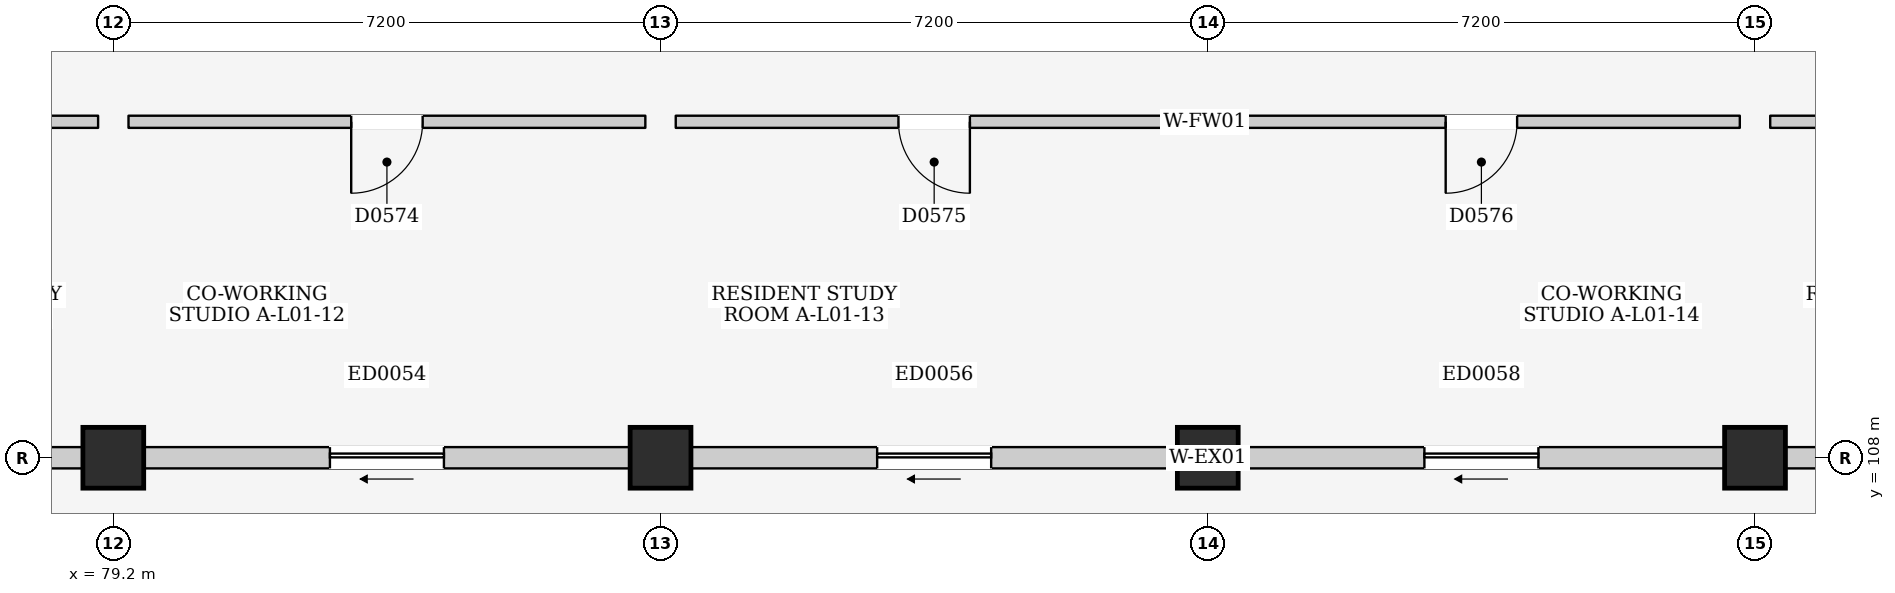
"""IFC4 building model, lengths in metres.
Left out: names, types, materials, properties, quantities, classifications, styles, units other than length and angle.
Written with IfcOpenShell. Run it as: python <this file> out.ifc"""

import sys

from ifc_helpers import new_model, si_unit, direction, frame, frame_2d, origin, origin_2d, place, context, subcontext, project, spatial, rectangle, extrude, element, fill, save


model = new_model("IFC4")
c1 = context("Model", 3, precision=1e-05, world=origin(), true_north=direction((0.0, 1.0)))
c2 = subcontext(c1, "Body", "Model", "MODEL_VIEW")
j1 = project(units=[si_unit("LENGTHUNIT", "METRE"), si_unit("PLANEANGLEUNIT", "RADIAN")], contexts=[c1])
p1 = place(None, origin())
s1 = spatial("IfcSite", under=j1, at=p1, CompositionType="ELEMENT")
p2 = place(p1, origin())
s2 = spatial("IfcBuilding", under=s1, at=p2, CompositionType="ELEMENT")
p3 = place(p2, frame((0.0, 0.0, 4.5)))
s3 = spatial("IfcBuildingStorey", under=s2, at=p3, CompositionType="ELEMENT", Elevation=4.5)
for number, where, z_axis, x_axis in (
    (1, (79.2, 108.0, 0.0), (0.0, 0.0, 1.0), (1.0, 0.0, 0.0)),
    (2, (86.4, 108.0, 0.0), (0.0, 0.0, 1.0), (1.0, 0.0, 0.0)),
    (3, (93.6, 108.0, 0.0), (0.0, 0.0, 1.0), (1.0, 0.0, 0.0)),
    (4, (100.8, 108.0, 0.0), (0.0, 0.0, 1.0), (1.0, 0.0, 0.0)),
):
    element("IfcColumn", number, at=place(p3, frame(where, z_axis=z_axis, x_axis=x_axis)), inside=s3, PredefinedType="COLUMN", context=c2, shape_type="SweptSolid", body=[
        extrude(rectangle(XDim=0.8, YDim=0.8, at=origin_2d()), origin(), (0.0, 0.0, 1.0), 4.5),
    ])
p4 = place(p3, frame((72.4, 108.0, 0.0), z_axis=(0.0, 0.0, 1.0), x_axis=(1.0, 0.0, 0.0)))
e5 = element("IfcWall", 5, at=p4, inside=s3, PredefinedType="ELEMENTEDWALL", context=c2, shape_type="SweptSolid", body=[
    extrude(rectangle(XDim=6.4, YDim=0.28, at=frame_2d((3.2, 0.0))), origin(), (0.0, 0.0, 1.0), 3.585),
])
p5 = place(p4, frame((2.45, 0.0, 0.0)))
e6 = element("IfcOpeningElement", 6, at=p5, cuts=e5, PredefinedType="OPENING", context=c2, shape_type="SweptSolid", body=[
    extrude(rectangle(XDim=1.5, YDim=2.12, at=frame_2d((0.75, 1.06))), frame((0.0, 0.155, 0.0), z_axis=(0.0, -1.0, 0.0), x_axis=(1.0, 0.0, 0.0)), (0.0, 0.0, 1.0), 0.31),
])
p6 = place(p3, frame((79.6, 108.0, 0.0), z_axis=(0.0, 0.0, 1.0), x_axis=(1.0, 0.0, 0.0)))
e7 = element("IfcWall", 7, at=p6, inside=s3, PredefinedType="ELEMENTEDWALL", context=c2, shape_type="SweptSolid", body=[
    extrude(rectangle(XDim=6.4, YDim=0.28, at=frame_2d((3.2, 0.0))), origin(), (0.0, 0.0, 1.0), 3.585),
])
p7 = place(p6, frame((2.45, 0.0, 0.0)))
e8 = element("IfcOpeningElement", 8, at=p7, cuts=e7, PredefinedType="OPENING", context=c2, shape_type="SweptSolid", body=[
    extrude(rectangle(XDim=1.5, YDim=2.12, at=frame_2d((0.75, 1.06))), frame((0.0, 0.155, 0.0), z_axis=(0.0, -1.0, 0.0), x_axis=(1.0, 0.0, 0.0)), (0.0, 0.0, 1.0), 0.31),
])
p8 = place(p3, frame((86.8, 108.0, 0.0), z_axis=(0.0, 0.0, 1.0), x_axis=(1.0, 0.0, 0.0)))
e9 = element("IfcWall", 9, at=p8, inside=s3, PredefinedType="ELEMENTEDWALL", context=c2, shape_type="SweptSolid", body=[
    extrude(rectangle(XDim=6.4, YDim=0.28, at=frame_2d((3.2, 0.0))), origin(), (0.0, 0.0, 1.0), 3.585),
])
p9 = place(p8, frame((2.45, 0.0, 0.0)))
e10 = element("IfcOpeningElement", 10, at=p9, cuts=e9, PredefinedType="OPENING", context=c2, shape_type="SweptSolid", body=[
    extrude(rectangle(XDim=1.5, YDim=2.12, at=frame_2d((0.75, 1.06))), frame((0.0, 0.155, 0.0), z_axis=(0.0, -1.0, 0.0), x_axis=(1.0, 0.0, 0.0)), (0.0, 0.0, 1.0), 0.31),
])
p10 = place(p3, frame((94.0, 108.0, 0.0), z_axis=(0.0, 0.0, 1.0), x_axis=(1.0, 0.0, 0.0)))
e11 = element("IfcWall", 11, at=p10, inside=s3, PredefinedType="ELEMENTEDWALL", context=c2, shape_type="SweptSolid", body=[
    extrude(rectangle(XDim=6.4, YDim=0.28, at=frame_2d((3.2, 0.0))), origin(), (0.0, 0.0, 1.0), 3.585),
])
p11 = place(p10, frame((2.45, 0.0, 0.0)))
e12 = element("IfcOpeningElement", 12, at=p11, cuts=e11, PredefinedType="OPENING", context=c2, shape_type="SweptSolid", body=[
    extrude(rectangle(XDim=1.5, YDim=2.12, at=frame_2d((0.75, 1.06))), frame((0.0, 0.155, 0.0), z_axis=(0.0, -1.0, 0.0), x_axis=(1.0, 0.0, 0.0)), (0.0, 0.0, 1.0), 0.31),
])
p12 = place(p3, frame((101.2, 108.0, 0.0), z_axis=(0.0, 0.0, 1.0), x_axis=(1.0, 0.0, 0.0)))
e13 = element("IfcWall", 13, at=p12, inside=s3, PredefinedType="ELEMENTEDWALL", context=c2, shape_type="SweptSolid", body=[
    extrude(rectangle(XDim=6.4, YDim=0.28, at=frame_2d((3.2, 0.0))), origin(), (0.0, 0.0, 1.0), 3.585),
])
p13 = place(p12, frame((2.45, 0.0, 0.0)))
e14 = element("IfcOpeningElement", 14, at=p13, cuts=e13, PredefinedType="OPENING", context=c2, shape_type="SweptSolid", body=[
    extrude(rectangle(XDim=1.5, YDim=2.12, at=frame_2d((0.75, 1.06))), frame((0.0, 0.155, 0.0), z_axis=(0.0, -1.0, 0.0), x_axis=(1.0, 0.0, 0.0)), (0.0, 0.0, 1.0), 0.31),
])
p14 = place(p3, frame((72.2, 112.42, 0.0), z_axis=(0.0, 0.0, 1.0), x_axis=(1.0, 0.0, 0.0)))
e15 = element("IfcWall", 15, at=p14, inside=s3, PredefinedType="PARTITIONING", context=c2, shape_type="SweptSolid", body=[
    extrude(rectangle(XDim=6.8, YDim=0.16, at=frame_2d((3.4, 0.0))), origin(), (0.0, 0.0, 1.0), 4.25),
])
p15 = place(p14, frame((2.93, 0.0, 0.0)))
e16 = element("IfcOpeningElement", 16, at=p15, cuts=e15, PredefinedType="OPENING", context=c2, shape_type="SweptSolid", body=[
    extrude(rectangle(XDim=0.94, YDim=2.12, at=frame_2d((0.47, 1.06))), frame((0.0, 0.095, 0.0), z_axis=(0.0, -1.0, 0.0), x_axis=(1.0, 0.0, 0.0)), (0.0, 0.0, 1.0), 0.19),
])
p16 = place(p3, frame((79.4, 112.42, 0.0), z_axis=(0.0, 0.0, 1.0), x_axis=(1.0, 0.0, 0.0)))
e17 = element("IfcWall", 17, at=p16, inside=s3, PredefinedType="PARTITIONING", context=c2, shape_type="SweptSolid", body=[
    extrude(rectangle(XDim=6.8, YDim=0.16, at=frame_2d((3.4, 0.0))), origin(), (0.0, 0.0, 1.0), 4.25),
])
p17 = place(p16, frame((2.93, 0.0, 0.0)))
e18 = element("IfcOpeningElement", 18, at=p17, cuts=e17, PredefinedType="OPENING", context=c2, shape_type="SweptSolid", body=[
    extrude(rectangle(XDim=0.94, YDim=2.12, at=frame_2d((0.47, 1.06))), frame((0.0, 0.095, 0.0), z_axis=(0.0, -1.0, 0.0), x_axis=(1.0, 0.0, 0.0)), (0.0, 0.0, 1.0), 0.19),
])
p18 = place(p3, frame((86.6, 112.42, 0.0), z_axis=(0.0, 0.0, 1.0), x_axis=(1.0, 0.0, 0.0)))
e19 = element("IfcWall", 19, at=p18, inside=s3, PredefinedType="PARTITIONING", context=c2, shape_type="SweptSolid", body=[
    extrude(rectangle(XDim=6.8, YDim=0.16, at=frame_2d((3.4, 0.0))), origin(), (0.0, 0.0, 1.0), 4.25),
])
p19 = place(p18, frame((2.93, 0.0, 0.0)))
e20 = element("IfcOpeningElement", 20, at=p19, cuts=e19, PredefinedType="OPENING", context=c2, shape_type="SweptSolid", body=[
    extrude(rectangle(XDim=0.94, YDim=2.12, at=frame_2d((0.47, 1.06))), frame((0.0, 0.095, 0.0), z_axis=(0.0, -1.0, 0.0), x_axis=(1.0, 0.0, 0.0)), (0.0, 0.0, 1.0), 0.19),
])
p20 = place(p3, frame((93.8, 112.42, 0.0), z_axis=(0.0, 0.0, 1.0), x_axis=(1.0, 0.0, 0.0)))
e21 = element("IfcWall", 21, at=p20, inside=s3, PredefinedType="PARTITIONING", context=c2, shape_type="SweptSolid", body=[
    extrude(rectangle(XDim=6.8, YDim=0.16, at=frame_2d((3.4, 0.0))), origin(), (0.0, 0.0, 1.0), 4.25),
])
p21 = place(p20, frame((2.93, 0.0, 0.0)))
e22 = element("IfcOpeningElement", 22, at=p21, cuts=e21, PredefinedType="OPENING", context=c2, shape_type="SweptSolid", body=[
    extrude(rectangle(XDim=0.94, YDim=2.12, at=frame_2d((0.47, 1.06))), frame((0.0, 0.095, 0.0), z_axis=(0.0, -1.0, 0.0), x_axis=(1.0, 0.0, 0.0)), (0.0, 0.0, 1.0), 0.19),
])
p22 = place(p3, frame((101.0, 112.42, 0.0), z_axis=(0.0, 0.0, 1.0), x_axis=(1.0, 0.0, 0.0)))
e23 = element("IfcWall", 23, at=p22, inside=s3, PredefinedType="PARTITIONING", context=c2, shape_type="SweptSolid", body=[
    extrude(rectangle(XDim=6.8, YDim=0.16, at=frame_2d((3.4, 0.0))), origin(), (0.0, 0.0, 1.0), 4.25),
])
p23 = place(p22, frame((2.93, 0.0, 0.0)))
e24 = element("IfcOpeningElement", 24, at=p23, cuts=e23, PredefinedType="OPENING", context=c2, shape_type="SweptSolid", body=[
    extrude(rectangle(XDim=0.94, YDim=2.12, at=frame_2d((0.47, 1.06))), frame((0.0, 0.095, 0.0), z_axis=(0.0, -1.0, 0.0), x_axis=(1.0, 0.0, 0.0)), (0.0, 0.0, 1.0), 0.19),
])
p24 = place(p7, frame((1.5, 0.0, 0.0), z_axis=(0.0, 0.0, 1.0), x_axis=(-1.0, 0.0, 0.0)))
e25 = element("IfcDoor", 25, at=p24, inside=s3, OperationType="SLIDING_TO_LEFT", PredefinedType="DOOR", context=c2, shape_type="SweptSolid", body=[
    extrude(rectangle(XDim=1.5, YDim=2.12, at=frame_2d((0.75, 1.06))), frame((0.0, 0.025, 0.0), z_axis=(0.0, -1.0, 0.0), x_axis=(1.0, 0.0, 0.0)), (0.0, 0.0, 1.0), 0.05),
])
fill(e8, e25)
p25 = place(p9, frame((1.5, 0.0, 0.0), z_axis=(0.0, 0.0, 1.0), x_axis=(-1.0, 0.0, 0.0)))
e26 = element("IfcDoor", 26, at=p25, inside=s3, OperationType="SLIDING_TO_LEFT", PredefinedType="DOOR", context=c2, shape_type="SweptSolid", body=[
    extrude(rectangle(XDim=1.5, YDim=2.12, at=frame_2d((0.75, 1.06))), frame((0.0, 0.025, 0.0), z_axis=(0.0, -1.0, 0.0), x_axis=(1.0, 0.0, 0.0)), (0.0, 0.0, 1.0), 0.05),
])
fill(e10, e26)
p26 = place(p11, frame((1.5, 0.0, 0.0), z_axis=(0.0, 0.0, 1.0), x_axis=(-1.0, 0.0, 0.0)))
e27 = element("IfcDoor", 27, at=p26, inside=s3, OperationType="SLIDING_TO_LEFT", PredefinedType="DOOR", context=c2, shape_type="SweptSolid", body=[
    extrude(rectangle(XDim=1.5, YDim=2.12, at=frame_2d((0.75, 1.06))), frame((0.0, 0.025, 0.0), z_axis=(0.0, -1.0, 0.0), x_axis=(1.0, 0.0, 0.0)), (0.0, 0.0, 1.0), 0.05),
])
fill(e12, e27)
p27 = place(p17, frame((0.94, 0.0, 0.0), z_axis=(0.0, 0.0, 1.0), x_axis=(-1.0, 0.0, 0.0)))
e28 = element("IfcDoor", 28, at=p27, inside=s3, OperationType="SINGLE_SWING_RIGHT", PredefinedType="DOOR", context=c2, shape_type="SweptSolid", body=[
    extrude(rectangle(XDim=0.94, YDim=2.12, at=frame_2d((0.47, 1.06))), frame((0.0, 0.025, 0.0), z_axis=(0.0, -1.0, 0.0), x_axis=(1.0, 0.0, 0.0)), (0.0, 0.0, 1.0), 0.05),
])
fill(e18, e28)
p28 = place(p19, frame((0.94, 0.0, 0.0), z_axis=(0.0, 0.0, 1.0), x_axis=(-1.0, 0.0, 0.0)))
e29 = element("IfcDoor", 29, at=p28, inside=s3, OperationType="SINGLE_SWING_LEFT", PredefinedType="DOOR", context=c2, shape_type="SweptSolid", body=[
    extrude(rectangle(XDim=0.94, YDim=2.12, at=frame_2d((0.47, 1.06))), frame((0.0, 0.025, 0.0), z_axis=(0.0, -1.0, 0.0), x_axis=(1.0, 0.0, 0.0)), (0.0, 0.0, 1.0), 0.05),
])
fill(e20, e29)
p29 = place(p21, frame((0.94, 0.0, 0.0), z_axis=(0.0, 0.0, 1.0), x_axis=(-1.0, 0.0, 0.0)))
e30 = element("IfcDoor", 30, at=p29, inside=s3, OperationType="SINGLE_SWING_RIGHT", PredefinedType="DOOR", context=c2, shape_type="SweptSolid", body=[
    extrude(rectangle(XDim=0.94, YDim=2.12, at=frame_2d((0.47, 1.06))), frame((0.0, 0.025, 0.0), z_axis=(0.0, -1.0, 0.0), x_axis=(1.0, 0.0, 0.0)), (0.0, 0.0, 1.0), 0.05),
])
fill(e22, e30)
save(model, sys.argv[1])
